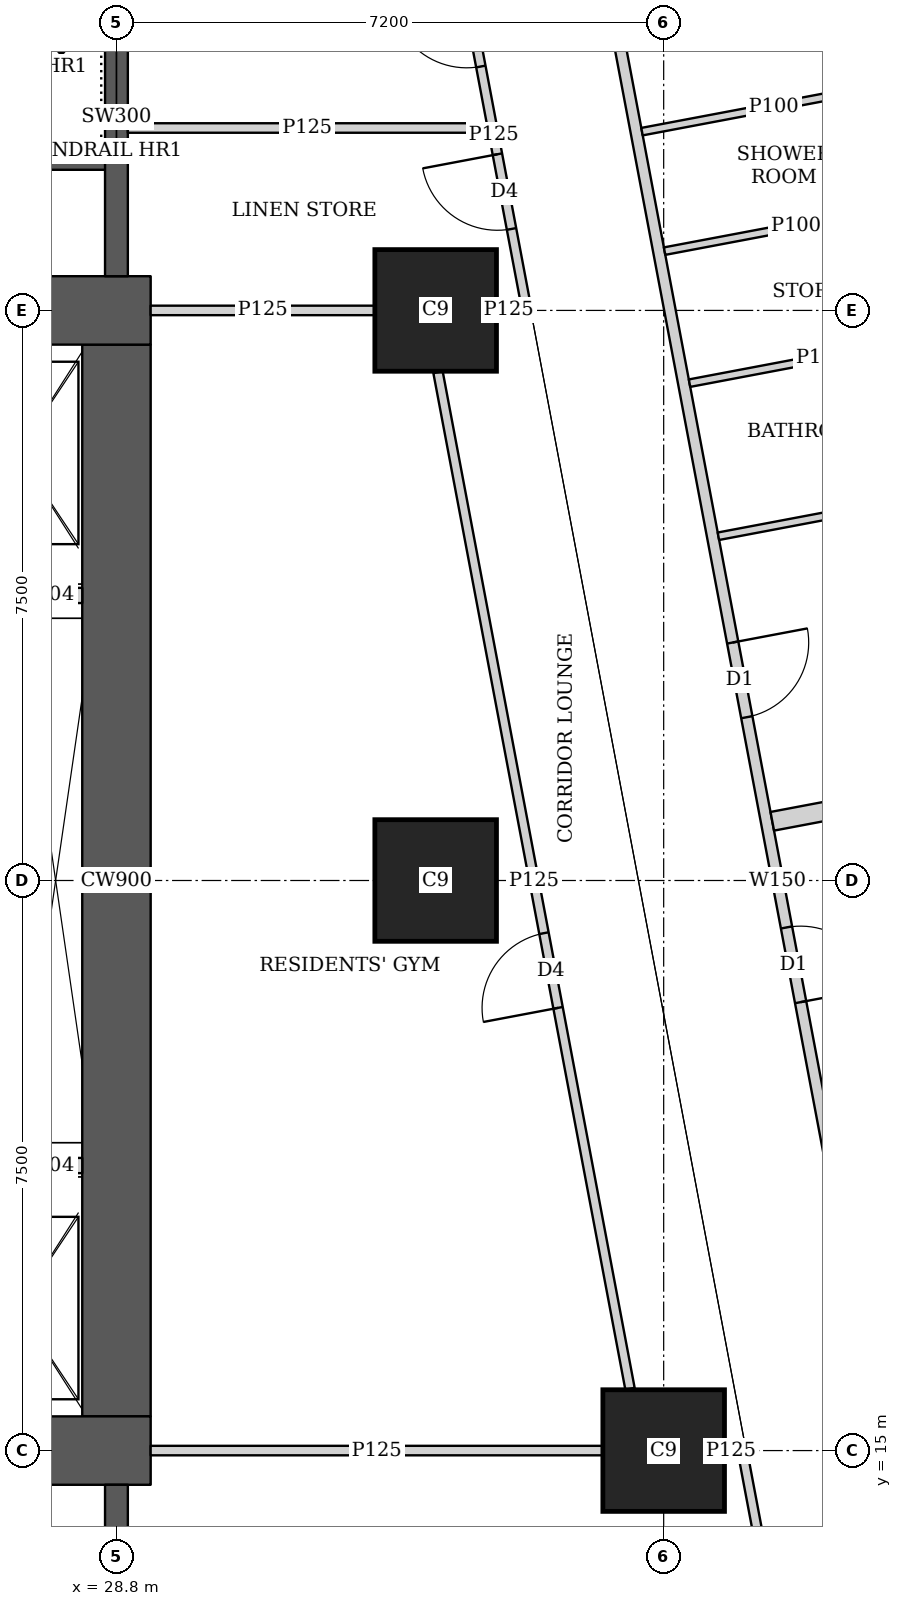
"""IFC4 building model, lengths in metres.
Left out: names, types, materials, properties, quantities, classifications, styles, units other than length and angle.
Written with IfcOpenShell. Run it as: python <this file> out.ifc"""

import sys

from ifc_helpers import new_model, si_unit, direction, frame, frame_2d, origin, origin_2d, place, context, subcontext, project, spatial, rectangle, extrude, element, fill, save


model = new_model("IFC4")
c1 = context("Model", 3, precision=1e-05, world=origin(), true_north=direction((0.0, 1.0)))
c2 = subcontext(c1, "Body", "Model", "MODEL_VIEW")
j1 = project(units=[si_unit("LENGTHUNIT", "METRE"), si_unit("PLANEANGLEUNIT", "RADIAN")], contexts=[c1])
p1 = place(None, origin())
s1 = spatial("IfcSite", under=j1, at=p1, CompositionType="ELEMENT")
p2 = place(p1, origin())
s2 = spatial("IfcBuilding", under=s1, at=p2, CompositionType="ELEMENT")
p3 = place(p2, frame((0.0, 0.0, 111.65)))
s3 = spatial("IfcBuildingStorey", under=s2, at=p3, CompositionType="ELEMENT", Elevation=111.65)
for number, where, z_axis, x_axis in (
    (1, (36.0, 15.0, 0.0), (0.0, 0.0, 1.0), (1.0, 0.0, 0.0)),
    (2, (33.0, 22.5, 0.0), (0.0, 0.0, 1.0), (1.0, 0.0, 0.0)),
    (3, (33.0, 30.0, 0.0), (0.0, 0.0, 1.0), (1.0, 0.0, 0.0)),
):
    element("IfcColumn", number, at=place(p3, frame(where, z_axis=z_axis, x_axis=x_axis)), inside=s3, PredefinedType="COLUMN", context=c2, shape_type="SweptSolid", body=[
        extrude(rectangle(XDim=1.6, YDim=1.6, at=origin_2d()), origin(), (0.0, 0.0, 1.0), 3.75),
    ])
p4 = place(p3, frame((13.95, 15.0, 0.0), z_axis=(0.0, 0.0, 1.0), x_axis=(1.0, 0.0, 0.0)))
e4 = element("IfcWall", 4, at=p4, inside=s3, PredefinedType="SHEAR", context=c2, shape_type="SweptSolid", body=[
    extrude(rectangle(XDim=15.3, YDim=0.9, at=frame_2d((7.65, 0.0))), origin(), (0.0, 0.0, 1.0), 3.75),
])
p5 = place(p4, frame((4.45, 0.0, 0.0)))
e5 = element("IfcOpeningElement", 5, at=p5, cuts=e4, PredefinedType="OPENING", context=c2, shape_type="SweptSolid", body=[
    extrude(rectangle(XDim=1.8, YDim=2.1, at=frame_2d((0.9, 1.05))), frame((0.0, 0.46, 0.0), z_axis=(0.0, -1.0, 0.0), x_axis=(1.0, 0.0, 0.0)), (0.0, 0.0, 1.0), 0.92),
])
p6 = place(p4, frame((10.7, 0.0, 0.0)))
e6 = element("IfcOpeningElement", 6, at=p6, cuts=e4, PredefinedType="OPENING", context=c2, shape_type="SweptSolid", body=[
    extrude(rectangle(XDim=1.1, YDim=2.1, at=frame_2d((0.55, 1.05))), frame((0.0, 0.46, 0.0), z_axis=(0.0, -1.0, 0.0), x_axis=(1.0, 0.0, 0.0)), (0.0, 0.0, 1.0), 0.92),
])
p7 = place(p3, frame((13.95, 30.0, 0.0), z_axis=(0.0, 0.0, 1.0), x_axis=(1.0, 0.0, 0.0)))
e7 = element("IfcWall", 7, at=p7, inside=s3, PredefinedType="SHEAR", context=c2, shape_type="SweptSolid", body=[
    extrude(rectangle(XDim=15.3, YDim=0.9, at=frame_2d((7.65, 0.0))), origin(), (0.0, 0.0, 1.0), 3.75),
])
p8 = place(p7, frame((4.45, 0.0, 0.0)))
e8 = element("IfcOpeningElement", 8, at=p8, cuts=e7, PredefinedType="OPENING", context=c2, shape_type="SweptSolid", body=[
    extrude(rectangle(XDim=1.8, YDim=2.1, at=frame_2d((0.9, 1.05))), frame((0.0, 0.46, 0.0), z_axis=(0.0, -1.0, 0.0), x_axis=(1.0, 0.0, 0.0)), (0.0, 0.0, 1.0), 0.92),
])
p9 = place(p7, frame((10.7, 0.0, 0.0)))
e9 = element("IfcOpeningElement", 9, at=p9, cuts=e7, PredefinedType="OPENING", context=c2, shape_type="SweptSolid", body=[
    extrude(rectangle(XDim=1.1, YDim=2.1, at=frame_2d((0.55, 1.05))), frame((0.0, 0.46, 0.0), z_axis=(0.0, -1.0, 0.0), x_axis=(1.0, 0.0, 0.0)), (0.0, 0.0, 1.0), 0.92),
])
p10 = place(p3, frame((28.8, 15.45, 0.0), z_axis=(0.0, 0.0, 1.0), x_axis=(0.0, 1.0, 0.0)))
e10 = element("IfcWall", 10, at=p10, inside=s3, PredefinedType="SHEAR", context=c2, shape_type="SweptSolid", body=[
    extrude(rectangle(XDim=14.1, YDim=0.9, at=frame_2d((7.05, 0.0))), origin(), (0.0, 0.0, 1.0), 3.75),
])
for number, where, z_axis, x_axis in (
    (11, (28.8, 10.35, 0.0), (0.0, 0.0, 1.0), (0.0, 1.0, 0.0)),
    (12, (28.8, 30.45, 0.0), (0.0, 0.0, 1.0), (0.0, 1.0, 0.0)),
):
    element("IfcWall", number, at=place(p3, frame(where, z_axis=z_axis, x_axis=x_axis)), inside=s3, PredefinedType="SHEAR", context=c2, shape_type="SweptSolid", body=[
        extrude(rectangle(XDim=4.2, YDim=0.3, at=frame_2d((2.1, 0.0))), origin(), (0.0, 0.0, 1.0), 3.75),
    ])
p11 = place(p3, frame((33.127, 45.65, 0.0), z_axis=(0.0, 0.0, 1.0), x_axis=(0.185598547723, -0.98262565562, 0.0)))
e13 = element("IfcWall", 13, at=p11, inside=s3, PredefinedType="SOLIDWALL", context=c2, shape_type="SweptSolid", body=[
    extrude(rectangle(XDim=47.118, YDim=0.15, at=frame_2d((23.559, 0.0))), origin(), (0.0, 0.0, 1.0), 2.2),
])
p12 = place(p11, frame((20.373, 0.0, 0.0)))
e14 = element("IfcOpeningElement", 14, at=p12, cuts=e13, PredefinedType="OPENING", context=c2, shape_type="SweptSolid", body=[
    extrude(rectangle(XDim=1.0, YDim=2.1, at=frame_2d((0.5, 1.05))), frame((0.0, 0.085, 0.0), z_axis=(0.0, -1.0, 0.0), x_axis=(1.0, 0.0, 0.0)), (0.0, 0.0, 1.0), 0.17),
])
p13 = place(p11, frame((24.188, 0.0, 0.0)))
e15 = element("IfcOpeningElement", 15, at=p13, cuts=e13, PredefinedType="OPENING", context=c2, shape_type="SweptSolid", body=[
    extrude(rectangle(XDim=1.0, YDim=2.1, at=frame_2d((0.5, 1.05))), frame((0.0, 0.085, 0.0), z_axis=(0.0, -1.0, 0.0), x_axis=(1.0, 0.0, 0.0)), (0.0, 0.0, 1.0), 0.17),
])
p14 = place(p11, frame((32.608, 0.0, 0.0)))
e16 = element("IfcOpeningElement", 16, at=p14, cuts=e13, PredefinedType="OPENING", context=c2, shape_type="SweptSolid", body=[
    extrude(rectangle(XDim=1.0, YDim=2.1, at=frame_2d((0.5, 1.05))), frame((0.0, 0.085, 0.0), z_axis=(0.0, -1.0, 0.0), x_axis=(1.0, 0.0, 0.0)), (0.0, 0.0, 1.0), 0.17),
])
p15 = place(p3, frame((37.473, 42.309, 0.0), z_axis=(0.0, 0.0, 1.0), x_axis=(0.185583982986, -0.982628406499, 0.0)))
e17 = element("IfcWall", 17, at=p15, inside=s3, PredefinedType="PARTITIONING", context=c2, shape_type="SweptSolid", body=[
    extrude(rectangle(XDim=14.825, YDim=0.1, at=frame_2d((7.412, 0.0))), origin(), (0.0, 0.0, 1.0), 2.5),
])
p16 = place(p15, frame((13.4, 0.0, 0.0)))
e18 = element("IfcOpeningElement", 18, at=p16, cuts=e17, PredefinedType="OPENING", context=c2, shape_type="SweptSolid", body=[
    extrude(rectangle(XDim=0.9, YDim=2.1, at=frame_2d((0.45, 1.05))), frame((0.0, 0.06, 0.0), z_axis=(0.0, -1.0, 0.0), x_axis=(1.0, 0.0, 0.0)), (0.0, 0.0, 1.0), 0.12),
])
p17 = place(p15, frame((9.808, 0.0, 0.0)))
e19 = element("IfcOpeningElement", 19, at=p17, cuts=e17, PredefinedType="OPENING", context=c2, shape_type="SweptSolid", body=[
    extrude(rectangle(XDim=0.9, YDim=2.1, at=frame_2d((0.45, 1.05))), frame((0.0, 0.06, 0.0), z_axis=(0.0, -1.0, 0.0), x_axis=(1.0, 0.0, 0.0)), (0.0, 0.0, 1.0), 0.12),
])
p18 = place(p15, frame((5.397, 0.0, 0.0)))
e20 = element("IfcOpeningElement", 20, at=p18, cuts=e17, PredefinedType="OPENING", context=c2, shape_type="SweptSolid", body=[
    extrude(rectangle(XDim=0.9, YDim=2.1, at=frame_2d((0.45, 1.05))), frame((0.0, 0.06, 0.0), z_axis=(0.0, -1.0, 0.0), x_axis=(1.0, 0.0, 0.0)), (0.0, 0.0, 1.0), 0.12),
])
p19 = place(p15, frame((2.853, 0.0, 0.0)))
e21 = element("IfcOpeningElement", 21, at=p19, cuts=e17, PredefinedType="OPENING", context=c2, shape_type="SweptSolid", body=[
    extrude(rectangle(XDim=0.9, YDim=2.1, at=frame_2d((0.45, 1.05))), frame((0.0, 0.06, 0.0), z_axis=(0.0, -1.0, 0.0), x_axis=(1.0, 0.0, 0.0)), (0.0, 0.0, 1.0), 0.12),
])
p20 = place(p15, frame((11.491, 0.0, 0.0)))
e22 = element("IfcOpeningElement", 22, at=p20, cuts=e17, PredefinedType="OPENING", context=c2, shape_type="SweptSolid", body=[
    extrude(rectangle(XDim=0.9, YDim=2.1, at=frame_2d((0.45, 1.05))), frame((0.0, 0.06, 0.0), z_axis=(0.0, -1.0, 0.0), x_axis=(1.0, 0.0, 0.0)), (0.0, 0.0, 1.0), 0.12),
])
p21 = place(p15, frame((7.9, 0.0, 0.0)))
e23 = element("IfcOpeningElement", 23, at=p21, cuts=e17, PredefinedType="OPENING", context=c2, shape_type="SweptSolid", body=[
    extrude(rectangle(XDim=0.9, YDim=2.1, at=frame_2d((0.45, 1.05))), frame((0.0, 0.06, 0.0), z_axis=(0.0, -1.0, 0.0), x_axis=(1.0, 0.0, 0.0)), (0.0, 0.0, 1.0), 0.12),
])
p22 = place(p3, frame((39.476, 31.434, 0.0), z_axis=(0.0, 0.0, 1.0), x_axis=(-0.982638553676, -0.185530247748, 0.0)))
e24 = element("IfcWall", 24, at=p22, inside=s3, PredefinedType="PARTITIONING", context=c2, shape_type="SweptSolid", body=[
    extrude(rectangle(XDim=3.525, YDim=0.1, at=frame_2d((1.763, 0.0))), origin(), (0.0, 0.0, 1.0), 3.5),
])
p23 = place(p3, frame((40.233, 27.693, 0.0), z_axis=(0.0, 0.0, 1.0), x_axis=(-0.982598214409, -0.185743772548, 0.0)))
e25 = element("IfcWall", 25, at=p23, inside=s3, PredefinedType="PARTITIONING", context=c2, shape_type="SweptSolid", body=[
    extrude(rectangle(XDim=3.575, YDim=0.1, at=frame_2d((1.788, 0.0))), origin(), (0.0, 0.0, 1.0), 3.5),
])
p24 = place(p3, frame((39.803, 29.698, 0.0), z_axis=(0.0, 0.0, 1.0), x_axis=(-0.982576058723, -0.185860939478, 0.0)))
e26 = element("IfcWall", 26, at=p24, inside=s3, PredefinedType="PARTITIONING", context=c2, shape_type="SweptSolid", body=[
    extrude(rectangle(XDim=3.524, YDim=0.1, at=frame_2d((1.762, 0.0))), origin(), (0.0, 0.0, 1.0), 2.5),
])
p25 = place(p3, frame((39.179, 33.006, 0.0), z_axis=(0.0, 0.0, 1.0), x_axis=(-0.982636169624, -0.185542874149, 0.0)))
e27 = element("IfcWall", 27, at=p25, inside=s3, PredefinedType="PARTITIONING", context=c2, shape_type="SweptSolid", body=[
    extrude(rectangle(XDim=3.525, YDim=0.1, at=frame_2d((1.763, 0.0))), origin(), (0.0, 0.0, 1.0), 3.5),
])
p26 = place(p3, frame((42.121, 24.166, 0.0), z_axis=(0.0, 0.0, 1.0), x_axis=(-0.98259850169, -0.185742252804, 0.0)))
e28 = element("IfcWall", 28, at=p26, inside=s3, PredefinedType="SOLIDWALL", context=c2, shape_type="SweptSolid", body=[
    extrude(rectangle(XDim=4.775, YDim=0.25, at=frame_2d((2.388, 0.0))), origin(), (0.0, 0.0, 1.0), 3.5),
])
p27 = place(p3, frame((37.9, 10.413, 0.0), z_axis=(0.0, 0.0, 1.0), x_axis=(-0.185513629891, 0.982641691119, 0.0)))
e29 = element("IfcWall", 29, at=p27, inside=s3, PredefinedType="PARTITIONING", context=c2, shape_type="SweptSolid", body=[
    extrude(rectangle(XDim=4.668, YDim=0.125, at=frame_2d((2.334, 0.0))), origin(), (0.0, 0.0, 1.0), 3.5),
])
p28 = place(p27, frame((0.708, 0.0, 0.0)))
e30 = element("IfcOpeningElement", 30, at=p28, cuts=e29, PredefinedType="OPENING", context=c2, shape_type="SweptSolid", body=[
    extrude(rectangle(XDim=1.0, YDim=2.1, at=frame_2d((0.5, 1.05))), frame((0.0, 0.073, 0.0), z_axis=(0.0, -1.0, 0.0), x_axis=(1.0, 0.0, 0.0)), (0.0, 0.0, 1.0), 0.145),
])
p29 = place(p3, frame((34.193, 30.04, 0.0), z_axis=(0.0, 0.0, 1.0), x_axis=(-0.185626015863, 0.982620467034, 0.0)))
e31 = element("IfcWall", 31, at=p29, inside=s3, PredefinedType="PARTITIONING", context=c2, shape_type="SweptSolid", body=[
    extrude(rectangle(XDim=4.628, YDim=0.125, at=frame_2d((2.314, 0.0))), origin(), (0.0, 0.0, 1.0), 2.5),
])
p30 = place(p29, frame((1.05, 0.0, 0.0)))
e32 = element("IfcOpeningElement", 32, at=p30, cuts=e31, PredefinedType="OPENING", context=c2, shape_type="SweptSolid", body=[
    extrude(rectangle(XDim=1.0, YDim=2.1, at=frame_2d((0.5, 1.05))), frame((0.0, 0.073, 0.0), z_axis=(0.0, -1.0, 0.0), x_axis=(1.0, 0.0, 0.0)), (0.0, 0.0, 1.0), 0.145),
])
p31 = place(p29, frame((3.225, 0.0, 0.0)))
e33 = element("IfcOpeningElement", 33, at=p31, cuts=e31, PredefinedType="OPENING", context=c2, shape_type="SweptSolid", body=[
    extrude(rectangle(XDim=1.0, YDim=2.1, at=frame_2d((0.5, 1.05))), frame((0.0, 0.073, 0.0), z_axis=(0.0, -1.0, 0.0), x_axis=(1.0, 0.0, 0.0)), (0.0, 0.0, 1.0), 0.145),
])
p32 = place(p3, frame((35.557, 15.813, 0.0), z_axis=(0.0, 0.0, 1.0), x_axis=(-0.185583681679, 0.982628463405, 0.0)))
e34 = element("IfcWall", 34, at=p32, inside=s3, PredefinedType="PARTITIONING", context=c2, shape_type="SweptSolid", body=[
    extrude(rectangle(XDim=13.61, YDim=0.125, at=frame_2d((6.805, 0.0))), origin(), (0.0, 0.0, 1.0), 2.5),
])
p33 = place(p32, frame((5.1, 0.0, 0.0)))
e35 = element("IfcOpeningElement", 35, at=p33, cuts=e34, PredefinedType="OPENING", context=c2, shape_type="SweptSolid", body=[
    extrude(rectangle(XDim=1.0, YDim=2.1, at=frame_2d((0.5, 1.05))), frame((0.0, 0.073, 0.0), z_axis=(0.0, -1.0, 0.0), x_axis=(1.0, 0.0, 0.0)), (0.0, 0.0, 1.0), 0.145),
])
p34 = place(p3, frame((29.25, 15.0, 0.0), z_axis=(0.0, 0.0, 1.0), x_axis=(1.0, 0.0, 0.0)))
e36 = element("IfcWall", 36, at=p34, inside=s3, PredefinedType="PARTITIONING", context=c2, shape_type="SweptSolid", body=[
    extrude(rectangle(XDim=5.949, YDim=0.125, at=frame_2d((2.975, 0.0))), origin(), (0.0, 0.0, 1.0), 3.5),
])
p35 = place(p3, frame((36.801, 15.0, 0.0), z_axis=(0.0, 0.0, 1.0), x_axis=(1.0, 0.0, 0.0)))
e37 = element("IfcWall", 37, at=p35, inside=s3, PredefinedType="PARTITIONING", context=c2, shape_type="SweptSolid", body=[
    extrude(rectangle(XDim=0.172, YDim=0.125, at=frame_2d((0.086, 0.0))), origin(), (0.0, 0.0, 1.0), 3.5),
])
p36 = place(p3, frame((29.25, 30.0, 0.0), z_axis=(0.0, 0.0, 1.0), x_axis=(1.0, 0.0, 0.0)))
e38 = element("IfcWall", 38, at=p36, inside=s3, PredefinedType="PARTITIONING", context=c2, shape_type="SweptSolid", body=[
    extrude(rectangle(XDim=2.949, YDim=0.125, at=frame_2d((1.475, 0.0))), origin(), (0.0, 0.0, 1.0), 3.5),
])
p37 = place(p3, frame((33.801, 30.0, 0.0), z_axis=(0.0, 0.0, 1.0), x_axis=(1.0, 0.0, 0.0)))
e39 = element("IfcWall", 39, at=p37, inside=s3, PredefinedType="PARTITIONING", context=c2, shape_type="SweptSolid", body=[
    extrude(rectangle(XDim=0.324, YDim=0.125, at=frame_2d((0.162, 0.0))), origin(), (0.0, 0.0, 1.0), 2.5),
])
p38 = place(p3, frame((28.95, 32.4, 0.0), z_axis=(0.0, 0.0, 1.0), x_axis=(1.0, 0.0, 0.0)))
e40 = element("IfcWall", 40, at=p38, inside=s3, PredefinedType="PARTITIONING", context=c2, shape_type="SweptSolid", body=[
    extrude(rectangle(XDim=4.722, YDim=0.125, at=frame_2d((2.361, 0.0))), origin(), (0.0, 0.0, 1.0), 3.5),
])
p39 = place(p3, frame((23.0, 31.95, 0.0), z_axis=(0.0, 0.0, 1.0), x_axis=(1.0, 0.0, 0.0)))
e41 = element("IfcWall", 41, at=p39, inside=s3, PredefinedType="SHEAR", context=c2, shape_type="SweptSolid", body=[
    extrude(rectangle(XDim=5.8, YDim=0.2, at=frame_2d((2.9, 0.0))), origin(), (0.0, 0.0, 1.0), 3.75),
])
for number, where, z_axis, x_axis in (
    (42, (27.4, 18.75, 0.0), (0.0, 0.0, 1.0), (1.0, 0.0, 0.0)),
    (43, (27.4, 26.25, 0.0), (0.0, 0.0, 1.0), (1.0, 0.0, 0.0)),
):
    element("IfcWall", number, at=place(p3, frame(where, z_axis=z_axis, x_axis=x_axis)), inside=s3, PredefinedType="SOLIDWALL", context=c2, shape_type="SweptSolid", body=[
        extrude(rectangle(XDim=0.95, YDim=0.2, at=frame_2d((0.475, 0.0))), origin(), (0.0, 0.0, 1.0), 3.5),
    ])
p40 = place(p12, origin())
e44 = element("IfcDoor", 44, at=p40, inside=s3, OperationType="SINGLE_SWING_LEFT", PredefinedType="DOOR", context=c2, shape_type="SweptSolid", body=[
    extrude(rectangle(XDim=1.0, YDim=2.1, at=frame_2d((0.5, 1.05))), frame((0.0, 0.025, 0.0), z_axis=(0.0, -1.0, 0.0), x_axis=(1.0, 0.0, 0.0)), (0.0, 0.0, 1.0), 0.05),
])
fill(e14, e44)
p41 = place(p13, origin())
e45 = element("IfcDoor", 45, at=p41, inside=s3, OperationType="SINGLE_SWING_RIGHT", PredefinedType="DOOR", context=c2, shape_type="SweptSolid", body=[
    extrude(rectangle(XDim=1.0, YDim=2.1, at=frame_2d((0.5, 1.05))), frame((0.0, 0.025, 0.0), z_axis=(0.0, -1.0, 0.0), x_axis=(1.0, 0.0, 0.0)), (0.0, 0.0, 1.0), 0.05),
])
fill(e15, e45)
p42 = place(p33, origin())
e46 = element("IfcDoor", 46, at=p42, inside=s3, OperationType="SINGLE_SWING_LEFT", PredefinedType="DOOR", context=c2, shape_type="SweptSolid", body=[
    extrude(rectangle(XDim=1.0, YDim=2.1, at=frame_2d((0.5, 1.05))), frame((0.0, 0.025, 0.0), z_axis=(0.0, -1.0, 0.0), x_axis=(1.0, 0.0, 0.0)), (0.0, 0.0, 1.0), 0.05),
])
fill(e35, e46)
p43 = place(p30, origin())
e47 = element("IfcDoor", 47, at=p43, inside=s3, OperationType="SINGLE_SWING_RIGHT", PredefinedType="DOOR", context=c2, shape_type="SweptSolid", body=[
    extrude(rectangle(XDim=1.0, YDim=2.1, at=frame_2d((0.5, 1.05))), frame((0.0, 0.025, 0.0), z_axis=(0.0, -1.0, 0.0), x_axis=(1.0, 0.0, 0.0)), (0.0, 0.0, 1.0), 0.05),
])
fill(e32, e47)
p44 = place(p31, origin())
e48 = element("IfcDoor", 48, at=p44, inside=s3, OperationType="SINGLE_SWING_RIGHT", PredefinedType="DOOR", context=c2, shape_type="SweptSolid", body=[
    extrude(rectangle(XDim=1.0, YDim=2.1, at=frame_2d((0.5, 1.05))), frame((0.0, 0.025, 0.0), z_axis=(0.0, -1.0, 0.0), x_axis=(1.0, 0.0, 0.0)), (0.0, 0.0, 1.0), 0.05),
])
fill(e33, e48)
save(model, sys.argv[1])
